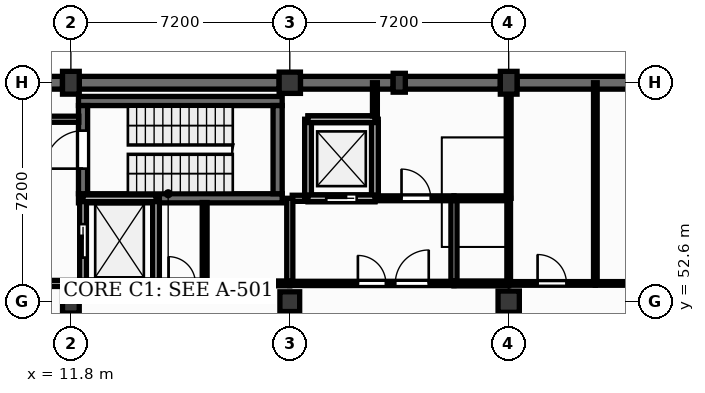
"""IFC4 building model, lengths in metres.
Left out: names, types, materials, properties, quantities, classifications, styles, units other than length and angle.
Written with IfcOpenShell. Run it as: python <this file> out.ifc"""

import sys

from ifc_helpers import new_model, si_unit, direction, frame, frame_2d, origin, origin_2d, place, context, subcontext, project, spatial, rectangle, extrude, element, fill, save


model = new_model("IFC4")
c1 = context("Model", 3, precision=1e-05, world=origin(), true_north=direction((0.0, 1.0)))
c2 = subcontext(c1, "Body", "Model", "MODEL_VIEW")
j1 = project(units=[si_unit("LENGTHUNIT", "METRE"), si_unit("PLANEANGLEUNIT", "RADIAN")], contexts=[c1])
p1 = place(None, origin())
s1 = spatial("IfcSite", under=j1, at=p1, CompositionType="ELEMENT")
p2 = place(p1, origin())
s2 = spatial("IfcBuilding", under=s1, at=p2, CompositionType="ELEMENT")
p3 = place(p2, frame((0.0, 0.0, -4.5)))
s3 = spatial("IfcBuildingStorey", under=s2, at=p3, CompositionType="ELEMENT", Elevation=-4.5)
for number, where, z_axis, x_axis in (
    (1, (11.8, 52.6, 0.0), (0.0, 0.0, 1.0), (1.0, 0.0, 0.0)),
    (2, (11.8, 59.8, 0.0), (0.0, 0.0, 1.0), (1.0, 0.0, 0.0)),
):
    element("IfcColumn", number, at=place(p3, frame(where, z_axis=z_axis, x_axis=x_axis)), inside=s3, PredefinedType="COLUMN", context=c2, shape_type="SweptSolid", body=[
        extrude(rectangle(XDim=0.55, YDim=0.75, at=origin_2d()), origin(), (0.0, 0.0, 1.0), 4.2),
    ])
p4 = place(p3, frame((19.0, 52.6, 0.0), z_axis=(0.0, 0.0, 1.0), x_axis=(1.0, 0.0, 0.0)))
e3 = element("IfcColumn", 3, at=p4, inside=s3, PredefinedType="COLUMN", context=c2, shape_type="SweptSolid", body=[
    extrude(rectangle(XDim=0.65, YDim=0.65, at=origin_2d()), origin(), (0.0, 0.0, 1.0), 4.2),
])
for number, where, z_axis, x_axis in (
    (4, (19.0, 59.8, 0.0), (0.0, 0.0, 1.0), (1.0, 0.0, 0.0)),
    (5, (26.2, 52.6, 0.0), (0.0, 0.0, 1.0), (1.0, 0.0, 0.0)),
):
    element("IfcColumn", number, at=place(p3, frame(where, z_axis=z_axis, x_axis=x_axis)), inside=s3, PredefinedType="COLUMN", context=c2, shape_type="SweptSolid", body=[
        extrude(rectangle(XDim=0.7, YDim=0.7, at=origin_2d()), origin(), (0.0, 0.0, 1.0), 4.2),
    ])
p5 = place(p3, frame((26.2, 59.8, 0.0), z_axis=(0.0, 0.0, 1.0), x_axis=(1.0, 0.0, 0.0)))
e6 = element("IfcColumn", 6, at=p5, inside=s3, PredefinedType="COLUMN", context=c2, shape_type="SweptSolid", body=[
    extrude(rectangle(XDim=0.55, YDim=0.75, at=origin_2d()), origin(), (0.0, 0.0, 1.0), 4.2),
])
p6 = place(p3, frame((22.6, 59.8, 0.0), z_axis=(0.0, 0.0, 1.0), x_axis=(1.0, 0.0, 0.0)))
e7 = element("IfcColumn", 7, at=p6, inside=s3, PredefinedType="PILASTER", context=c2, shape_type="SweptSolid", body=[
    extrude(rectangle(XDim=0.4, YDim=0.62, at=origin_2d()), origin(), (0.0, 0.0, 1.0), 4.2),
])
p7 = place(p3, frame((8.4, 59.8, 0.0), z_axis=(0.0, 0.0, 1.0), x_axis=(1.0, 0.0, 0.0)))
e8 = element("IfcWall", 8, at=p7, inside=s3, PredefinedType="USERDEFINED", context=c2, shape_type="SweptSolid", body=[
    extrude(rectangle(XDim=3.125, YDim=0.42, at=frame_2d((1.562, 0.0))), origin(), (0.0, 0.0, 1.0), 4.2),
])
p8 = place(p3, frame((12.075, 59.8, 0.0), z_axis=(0.0, 0.0, 1.0), x_axis=(1.0, 0.0, 0.0)))
e9 = element("IfcWall", 9, at=p8, inside=s3, PredefinedType="USERDEFINED", context=c2, shape_type="SweptSolid", body=[
    extrude(rectangle(XDim=6.575, YDim=0.42, at=frame_2d((3.288, 0.0))), origin(), (0.0, 0.0, 1.0), 4.2),
])
p9 = place(p3, frame((19.35, 59.8, 0.0), z_axis=(0.0, 0.0, 1.0), x_axis=(1.0, 0.0, 0.0)))
e10 = element("IfcWall", 10, at=p9, inside=s3, PredefinedType="USERDEFINED", context=c2, shape_type="SweptSolid", body=[
    extrude(rectangle(XDim=3.05, YDim=0.42, at=frame_2d((1.525, 0.0))), origin(), (0.0, 0.0, 1.0), 4.2),
])
p10 = place(p3, frame((22.8, 59.8, 0.0), z_axis=(0.0, 0.0, 1.0), x_axis=(1.0, 0.0, 0.0)))
e11 = element("IfcWall", 11, at=p10, inside=s3, PredefinedType="USERDEFINED", context=c2, shape_type="SweptSolid", body=[
    extrude(rectangle(XDim=3.125, YDim=0.42, at=frame_2d((1.562, 0.0))), origin(), (0.0, 0.0, 1.0), 4.2),
])
p11 = place(p3, frame((26.475, 59.8, 0.0), z_axis=(0.0, 0.0, 1.0), x_axis=(1.0, 0.0, 0.0)))
e12 = element("IfcWall", 12, at=p11, inside=s3, PredefinedType="USERDEFINED", context=c2, shape_type="SweptSolid", body=[
    extrude(rectangle(XDim=6.6, YDim=0.42, at=frame_2d((3.3, 0.0))), origin(), (0.0, 0.0, 1.0), 4.2),
])
for number, where, z_axis, x_axis in (
    (13, (12.05, 56.0, 0.0), (0.0, 0.0, 1.0), (1.0, 0.0, 0.0)),
    (14, (12.05, 59.2, 0.0), (0.0, 0.0, 1.0), (1.0, 0.0, 0.0)),
):
    element("IfcWall", number, at=place(p3, frame(where, z_axis=z_axis, x_axis=x_axis)), inside=s3, PredefinedType="SHEAR", context=c2, shape_type="SweptSolid", body=[
        extrude(rectangle(XDim=6.7, YDim=0.3, at=frame_2d((3.35, 0.0))), origin(), (0.0, 0.0, 1.0), 4.25),
    ])
p12 = place(p3, frame((12.2, 56.15, 0.0), z_axis=(0.0, 0.0, 1.0), x_axis=(0.0, 1.0, 0.0)))
e15 = element("IfcWall", 15, at=p12, inside=s3, PredefinedType="SHEAR", context=c2, shape_type="SweptSolid", body=[
    extrude(rectangle(XDim=2.9, YDim=0.3, at=frame_2d((1.45, 0.0))), origin(), (0.0, 0.0, 1.0), 4.25),
])
p13 = place(p12, frame((0.825, 0.0, 0.0)))
e16 = element("IfcOpeningElement", 16, at=p13, cuts=e15, PredefinedType="OPENING", context=c2, shape_type="SweptSolid", body=[
    extrude(rectangle(XDim=1.25, YDim=2.15, at=frame_2d((0.625, 1.075))), frame((0.0, 0.16, 0.0), z_axis=(0.0, -1.0, 0.0), x_axis=(1.0, 0.0, 0.0)), (0.0, 0.0, 1.0), 0.32),
])
p14 = place(p3, frame((18.6, 56.15, 0.0), z_axis=(0.0, 0.0, 1.0), x_axis=(0.0, 1.0, 0.0)))
e17 = element("IfcWall", 17, at=p14, inside=s3, PredefinedType="SHEAR", context=c2, shape_type="SweptSolid", body=[
    extrude(rectangle(XDim=2.9, YDim=0.3, at=frame_2d((1.45, 0.0))), origin(), (0.0, 0.0, 1.0), 4.25),
])
p15 = place(p3, frame((12.2, 53.2, 0.0), z_axis=(0.0, 0.0, 1.0), x_axis=(1.0, 0.0, 0.0)))
e18 = element("IfcWall", 18, at=p15, inside=s3, PredefinedType="SOLIDWALL", context=c2, shape_type="SweptSolid", body=[
    extrude(rectangle(XDim=2.4, YDim=0.22, at=frame_2d((1.2, 0.0))), origin(), (0.0, 0.0, 1.0), 4.25),
])
p16 = place(p3, frame((12.2, 53.31, 0.0), z_axis=(0.0, 0.0, 1.0), x_axis=(0.0, 1.0, 0.0)))
e19 = element("IfcWall", 19, at=p16, inside=s3, PredefinedType="SOLIDWALL", context=c2, shape_type="SweptSolid", body=[
    extrude(rectangle(XDim=2.58, YDim=0.22, at=frame_2d((1.29, 0.0))), origin(), (0.0, 0.0, 1.0), 4.25),
])
p17 = place(p16, frame((0.74, 0.0, 0.0)))
e20 = element("IfcOpeningElement", 20, at=p17, cuts=e19, PredefinedType="OPENING", context=c2, shape_type="SweptSolid", body=[
    extrude(rectangle(XDim=1.1, YDim=2.15, at=frame_2d((0.55, 1.075))), frame((0.0, 0.12, 0.0), z_axis=(0.0, -1.0, 0.0), x_axis=(1.0, 0.0, 0.0)), (0.0, 0.0, 1.0), 0.24),
])
p18 = place(p3, frame((14.6, 53.31, 0.0), z_axis=(0.0, 0.0, 1.0), x_axis=(0.0, 1.0, 0.0)))
e21 = element("IfcWall", 21, at=p18, inside=s3, PredefinedType="SOLIDWALL", context=c2, shape_type="SweptSolid", body=[
    extrude(rectangle(XDim=2.58, YDim=0.22, at=frame_2d((1.29, 0.0))), origin(), (0.0, 0.0, 1.0), 4.25),
])
for number, where, z_axis, x_axis in (
    (22, (12.2, 53.2, -0.9), (0.0, 0.0, 1.0), (0.0, 1.0, 0.0)),
    (23, (14.6, 53.2, -0.9), (0.0, 0.0, 1.0), (0.0, 1.0, 0.0)),
):
    element("IfcWall", number, at=place(p3, frame(where, z_axis=z_axis, x_axis=x_axis)), inside=s3, PredefinedType="SOLIDWALL", context=c2, shape_type="SweptSolid", body=[
        extrude(rectangle(XDim=2.8, YDim=0.22, at=frame_2d((1.4, 0.0))), origin(), (0.0, 0.0, 1.0), 0.9),
    ])
for number, where, z_axis, x_axis in (
    (24, (12.2, 53.2, -0.9), (0.0, 0.0, 1.0), (1.0, 0.0, 0.0)),
    (25, (12.2, 56.0, -0.9), (0.0, 0.0, 1.0), (1.0, 0.0, 0.0)),
):
    element("IfcWall", number, at=place(p3, frame(where, z_axis=z_axis, x_axis=x_axis)), inside=s3, PredefinedType="SOLIDWALL", context=c2, shape_type="SweptSolid", body=[
        extrude(rectangle(XDim=2.4, YDim=0.22, at=frame_2d((1.2, 0.0))), origin(), (0.0, 0.0, 1.0), 0.9),
    ])
p19 = place(p3, frame((19.6, 56.0, 0.0), z_axis=(0.0, 0.0, 1.0), x_axis=(1.0, 0.0, 0.0)))
e26 = element("IfcWall", 26, at=p19, inside=s3, PredefinedType="SOLIDWALL", context=c2, shape_type="SweptSolid", body=[
    extrude(rectangle(XDim=2.2, YDim=0.22, at=frame_2d((1.1, 0.0))), origin(), (0.0, 0.0, 1.0), 4.25),
])
p20 = place(p19, frame((0.6, 0.0, 0.0)))
e27 = element("IfcOpeningElement", 27, at=p20, cuts=e26, PredefinedType="OPENING", context=c2, shape_type="SweptSolid", body=[
    extrude(rectangle(XDim=1.0, YDim=2.15, at=frame_2d((0.5, 1.075))), frame((0.0, 0.12, 0.0), z_axis=(0.0, -1.0, 0.0), x_axis=(1.0, 0.0, 0.0)), (0.0, 0.0, 1.0), 0.24),
])
p21 = place(p3, frame((19.6, 58.6, 0.0), z_axis=(0.0, 0.0, 1.0), x_axis=(1.0, 0.0, 0.0)))
e28 = element("IfcWall", 28, at=p21, inside=s3, PredefinedType="SOLIDWALL", context=c2, shape_type="SweptSolid", body=[
    extrude(rectangle(XDim=2.2, YDim=0.22, at=frame_2d((1.1, 0.0))), origin(), (0.0, 0.0, 1.0), 4.25),
])
for number, where, z_axis, x_axis in (
    (29, (19.6, 56.11, 0.0), (0.0, 0.0, 1.0), (0.0, 1.0, 0.0)),
    (30, (21.8, 56.11, 0.0), (0.0, 0.0, 1.0), (0.0, 1.0, 0.0)),
):
    element("IfcWall", number, at=place(p3, frame(where, z_axis=z_axis, x_axis=x_axis)), inside=s3, PredefinedType="SOLIDWALL", context=c2, shape_type="SweptSolid", body=[
        extrude(rectangle(XDim=2.38, YDim=0.22, at=frame_2d((1.19, 0.0))), origin(), (0.0, 0.0, 1.0), 4.25),
    ])
for number, where, z_axis, x_axis in (
    (31, (19.6, 56.0, -0.9), (0.0, 0.0, 1.0), (0.0, 1.0, 0.0)),
    (32, (21.8, 56.0, -0.9), (0.0, 0.0, 1.0), (0.0, 1.0, 0.0)),
):
    element("IfcWall", number, at=place(p3, frame(where, z_axis=z_axis, x_axis=x_axis)), inside=s3, PredefinedType="SOLIDWALL", context=c2, shape_type="SweptSolid", body=[
        extrude(rectangle(XDim=2.6, YDim=0.22, at=frame_2d((1.3, 0.0))), origin(), (0.0, 0.0, 1.0), 0.9),
    ])
for number, where, z_axis, x_axis in (
    (33, (19.6, 56.0, -0.9), (0.0, 0.0, 1.0), (1.0, 0.0, 0.0)),
    (34, (19.6, 58.6, -0.9), (0.0, 0.0, 1.0), (1.0, 0.0, 0.0)),
):
    element("IfcWall", number, at=place(p3, frame(where, z_axis=z_axis, x_axis=x_axis)), inside=s3, PredefinedType="SOLIDWALL", context=c2, shape_type="SweptSolid", body=[
        extrude(rectangle(XDim=2.2, YDim=0.22, at=frame_2d((1.1, 0.0))), origin(), (0.0, 0.0, 1.0), 0.9),
    ])
p22 = place(p3, frame((7.8, 53.2, 0.0), z_axis=(0.0, 0.0, 1.0), x_axis=(1.0, 0.0, 0.0)))
e35 = element("IfcWall", 35, at=p22, inside=s3, PredefinedType="PARTITIONING", context=c2, shape_type="SweptSolid", body=[
    extrude(rectangle(XDim=4.29, YDim=0.2, at=frame_2d((2.145, 0.0))), origin(), (0.0, 0.0, 1.0), 4.08),
])
p23 = place(p22, frame((1.405, 0.0, 0.0)))
e36 = element("IfcOpeningElement", 36, at=p23, cuts=e35, PredefinedType="OPENING", context=c2, shape_type="SweptSolid", body=[
    extrude(rectangle(XDim=1.48, YDim=2.25, at=frame_2d((0.74, 1.125))), frame((0.0, 0.11, 0.0), z_axis=(0.0, -1.0, 0.0), x_axis=(1.0, 0.0, 0.0)), (0.0, 0.0, 1.0), 0.22),
])
p24 = place(p3, frame((14.71, 53.2, 0.0), z_axis=(0.0, 0.0, 1.0), x_axis=(1.0, 0.0, 0.0)))
e37 = element("IfcWall", 37, at=p24, inside=s3, PredefinedType="SOLIDWALL", context=c2, shape_type="SweptSolid", body=[
    extrude(rectangle(XDim=1.49, YDim=0.22, at=frame_2d((0.745, 0.0))), origin(), (0.0, 0.0, 1.0), 4.08),
])
p25 = place(p24, frame((0.305, 0.0, 0.0)))
e38 = element("IfcOpeningElement", 38, at=p25, cuts=e37, PredefinedType="OPENING", context=c2, shape_type="SweptSolid", body=[
    extrude(rectangle(XDim=0.88, YDim=2.05, at=frame_2d((0.44, 1.025))), frame((0.0, 0.12, 0.0), z_axis=(0.0, -1.0, 0.0), x_axis=(1.0, 0.0, 0.0)), (0.0, 0.0, 1.0), 0.24),
])
p26 = place(p3, frame((19.0, 53.2, 0.0), z_axis=(0.0, 0.0, 1.0), x_axis=(1.0, 0.0, 0.0)))
e39 = element("IfcWall", 39, at=p26, inside=s3, PredefinedType="PARTITIONING", context=c2, shape_type="SweptSolid", body=[
    extrude(rectangle(XDim=5.4, YDim=0.14, at=frame_2d((2.7, 0.0))), origin(), (0.0, 0.0, 1.0), 4.08),
])
p27 = place(p26, frame((2.24, 0.0, 0.0)))
e40 = element("IfcOpeningElement", 40, at=p27, cuts=e39, PredefinedType="OPENING", context=c2, shape_type="SweptSolid", body=[
    extrude(rectangle(XDim=0.92, YDim=2.1, at=frame_2d((0.46, 1.05))), frame((0.0, 0.08, 0.0), z_axis=(0.0, -1.0, 0.0), x_axis=(1.0, 0.0, 0.0)), (0.0, 0.0, 1.0), 0.16),
])
p28 = place(p26, frame((3.47, 0.0, 0.0)))
e41 = element("IfcOpeningElement", 41, at=p28, cuts=e39, PredefinedType="OPENING", context=c2, shape_type="SweptSolid", body=[
    extrude(rectangle(XDim=1.1, YDim=2.1, at=frame_2d((0.55, 1.05))), frame((0.0, 0.08, 0.0), z_axis=(0.0, -1.0, 0.0), x_axis=(1.0, 0.0, 0.0)), (0.0, 0.0, 1.0), 0.16),
])
p29 = place(p3, frame((21.91, 56.0, 0.0), z_axis=(0.0, 0.0, 1.0), x_axis=(1.0, 0.0, 0.0)))
e42 = element("IfcWall", 42, at=p29, inside=s3, PredefinedType="PARTITIONING", context=c2, shape_type="SweptSolid", body=[
    extrude(rectangle(XDim=2.49, YDim=0.16, at=frame_2d((1.245, 0.0))), origin(), (0.0, 0.0, 1.0), 4.08),
])
p30 = place(p29, frame((0.765, 0.0, 0.0)))
e43 = element("IfcOpeningElement", 43, at=p30, cuts=e42, PredefinedType="OPENING", context=c2, shape_type="SweptSolid", body=[
    extrude(rectangle(XDim=0.96, YDim=2.1, at=frame_2d((0.48, 1.05))), frame((0.0, 0.09, 0.0), z_axis=(0.0, -1.0, 0.0), x_axis=(1.0, 0.0, 0.0)), (0.0, 0.0, 1.0), 0.18),
])
p31 = place(p3, frame((26.2, 53.2, 0.0), z_axis=(0.0, 0.0, 1.0), x_axis=(1.0, 0.0, 0.0)))
e44 = element("IfcWall", 44, at=p31, inside=s3, PredefinedType="PLUMBINGWALL", context=c2, shape_type="SweptSolid", body=[
    extrude(rectangle(XDim=2.85, YDim=0.12, at=frame_2d((1.425, 0.0))), origin(), (0.0, 0.0, 1.0), 4.08),
])
p32 = place(p31, frame((0.95, 0.0, 0.0)))
e45 = element("IfcOpeningElement", 45, at=p32, cuts=e44, PredefinedType="OPENING", context=c2, shape_type="SweptSolid", body=[
    extrude(rectangle(XDim=0.95, YDim=2.1, at=frame_2d((0.475, 1.05))), frame((0.0, 0.07, 0.0), z_axis=(0.0, -1.0, 0.0), x_axis=(1.0, 0.0, 0.0)), (0.0, 0.0, 1.0), 0.14),
])
p33 = place(p3, frame((26.2, 56.0, 0.0), z_axis=(0.0, 0.0, 1.0), x_axis=(0.0, 1.0, 0.0)))
e46 = element("IfcWall", 46, at=p33, inside=s3, PredefinedType="PARTITIONING", context=c2, shape_type="SweptSolid", body=[
    extrude(rectangle(XDim=3.425, YDim=0.16, at=frame_2d((1.712, 0.0))), origin(), (0.0, 0.0, 1.0), 3.5),
])
p34 = place(p3, frame((29.05, 53.27, 0.0), z_axis=(0.0, 0.0, 1.0), x_axis=(0.0, 1.0, 0.0)))
e47 = element("IfcWall", 47, at=p34, inside=s3, PredefinedType="PLUMBINGWALL", context=c2, shape_type="SweptSolid", body=[
    extrude(rectangle(XDim=6.53, YDim=0.12, at=frame_2d((3.265, 0.0))), origin(), (0.0, 0.0, 1.0), 4.08),
])
p35 = place(p3, frame((29.05, 53.2, 0.0), z_axis=(0.0, 0.0, 1.0), x_axis=(1.0, 0.0, 0.0)))
e48 = element("IfcWall", 48, at=p35, inside=s3, PredefinedType="PLUMBINGWALL", context=c2, shape_type="SweptSolid", body=[
    extrude(rectangle(XDim=4.35, YDim=0.12, at=frame_2d((2.175, 0.0))), origin(), (0.0, 0.0, 1.0), 4.08),
])
p36 = place(p35, frame((1.7, 0.0, 0.0)))
e49 = element("IfcOpeningElement", 49, at=p36, cuts=e48, PredefinedType="OPENING", context=c2, shape_type="SweptSolid", body=[
    extrude(rectangle(XDim=0.95, YDim=2.1, at=frame_2d((0.475, 1.05))), frame((0.0, 0.07, 0.0), z_axis=(0.0, -1.0, 0.0), x_axis=(1.0, 0.0, 0.0)), (0.0, 0.0, 1.0), 0.14),
])
p37 = place(p3, frame((16.2, 53.27, 0.0), z_axis=(0.0, 0.0, 1.0), x_axis=(0.0, 1.0, 0.0)))
e50 = element("IfcWall", 50, at=p37, inside=s3, PredefinedType="PARTITIONING", context=c2, shape_type="SweptSolid", body=[
    extrude(rectangle(XDim=2.59, YDim=0.16, at=frame_2d((1.295, 0.0))), origin(), (0.0, 0.0, 1.0), 4.08),
])
p38 = place(p3, frame((12.06, 58.6, 0.0), z_axis=(0.0, 0.0, 1.0), x_axis=(-1.0, 0.0, 0.0)))
e51 = element("IfcWall", 51, at=p38, inside=s3, PredefinedType="PARTITIONING", context=c2, shape_type="SweptSolid", body=[
    extrude(rectangle(XDim=4.26, YDim=0.2, at=frame_2d((2.13, 0.0))), origin(), (0.0, 0.0, 1.0), 4.08),
])
p39 = place(p3, frame((24.4, 53.27, 0.0), z_axis=(0.0, 0.0, 1.0), x_axis=(0.0, 1.0, 0.0)))
e52 = element("IfcWall", 52, at=p39, inside=s3, PredefinedType="PARTITIONING", context=c2, shape_type="SweptSolid", body=[
    extrude(rectangle(XDim=2.66, YDim=0.2, at=frame_2d((1.33, 0.0))), origin(), (0.0, 0.0, 1.0), 4.08),
])
p40 = place(p3, frame((19.49, 56.0, 0.0), z_axis=(0.0, 0.0, 1.0), x_axis=(-1.0, 0.0, 0.0)))
e53 = element("IfcWall", 53, at=p40, inside=s3, PredefinedType="PARTITIONING", context=c2, shape_type="SweptSolid", body=[
    extrude(rectangle(XDim=0.41, YDim=0.2, at=frame_2d((0.205, 0.0))), origin(), (0.0, 0.0, 1.0), 4.08),
])
p41 = place(p3, frame((19.0, 53.27, 0.0), z_axis=(0.0, 0.0, 1.0), x_axis=(0.0, 1.0, 0.0)))
e54 = element("IfcWall", 54, at=p41, inside=s3, PredefinedType="PARTITIONING", context=c2, shape_type="SweptSolid", body=[
    extrude(rectangle(XDim=2.73, YDim=0.2, at=frame_2d((1.365, 0.0))), origin(), (0.0, 0.0, 1.0), 3.5),
])
p42 = place(p3, frame((26.2, 53.2, 0.0), z_axis=(0.0, 0.0, 1.0), x_axis=(-1.0, 0.0, 0.0)))
e55 = element("IfcWall", 55, at=p42, inside=s3, PredefinedType="PARTITIONING", context=c2, shape_type="SweptSolid", body=[
    extrude(rectangle(XDim=1.8, YDim=0.16, at=frame_2d((0.9, 0.0))), origin(), (0.0, 0.0, 1.0), 4.08),
])
p43 = place(p3, frame((19.0, 53.2, 0.0), z_axis=(0.0, 0.0, 1.0), x_axis=(-1.0, 0.0, 0.0)))
e56 = element("IfcWall", 56, at=p43, inside=s3, PredefinedType="PARTITIONING", context=c2, shape_type="SweptSolid", body=[
    extrude(rectangle(XDim=2.8, YDim=0.16, at=frame_2d((1.4, 0.0))), origin(), (0.0, 0.0, 1.0), 4.08),
])
p44 = place(p3, frame((26.2, 53.27, 0.0), z_axis=(0.0, 0.0, 1.0), x_axis=(0.0, 1.0, 0.0)))
e57 = element("IfcWall", 57, at=p44, inside=s3, PredefinedType="PLUMBINGWALL", context=c2, shape_type="SweptSolid", body=[
    extrude(rectangle(XDim=2.73, YDim=0.12, at=frame_2d((1.365, 0.0))), origin(), (0.0, 0.0, 1.0), 3.5),
])
p45 = place(p3, frame((24.4, 56.0, 0.0), z_axis=(0.0, 0.0, 1.0), x_axis=(1.0, 0.0, 0.0)))
e58 = element("IfcWall", 58, at=p45, inside=s3, PredefinedType="PARTITIONING", context=c2, shape_type="SweptSolid", body=[
    extrude(rectangle(XDim=1.8, YDim=0.16, at=frame_2d((0.9, 0.0))), origin(), (0.0, 0.0, 1.0), 4.08),
])
p46 = place(p3, frame((21.8, 58.71, 0.0), z_axis=(0.0, 0.0, 1.0), x_axis=(0.0, 1.0, 0.0)))
e59 = element("IfcWall", 59, at=p46, inside=s3, PredefinedType="PARTITIONING", context=c2, shape_type="SweptSolid", body=[
    extrude(rectangle(XDim=1.09, YDim=0.16, at=frame_2d((0.545, 0.0))), origin(), (0.0, 0.0, 1.0), 4.08),
])
p47 = place(p17, origin())
e60 = element("IfcDoor", 60, at=p47, inside=s3, OperationType="SLIDING_TO_LEFT", PredefinedType="DOOR", context=c2, shape_type="SweptSolid", body=[
    extrude(rectangle(XDim=1.1, YDim=2.15, at=frame_2d((0.55, 1.075))), frame((0.0, 0.025, 0.0), z_axis=(0.0, -1.0, 0.0), x_axis=(1.0, 0.0, 0.0)), (0.0, 0.0, 1.0), 0.05),
])
fill(e20, e60)
p48 = place(p20, origin())
e61 = element("IfcDoor", 61, at=p48, inside=s3, OperationType="SLIDING_TO_LEFT", PredefinedType="DOOR", context=c2, shape_type="SweptSolid", body=[
    extrude(rectangle(XDim=1.0, YDim=2.15, at=frame_2d((0.5, 1.075))), frame((0.0, 0.025, 0.0), z_axis=(0.0, -1.0, 0.0), x_axis=(1.0, 0.0, 0.0)), (0.0, 0.0, 1.0), 0.05),
])
fill(e27, e61)
p49 = place(p13, origin())
e62 = element("IfcDoor", 62, at=p49, inside=s3, OperationType="SINGLE_SWING_LEFT", PredefinedType="DOOR", context=c2, shape_type="SweptSolid", body=[
    extrude(rectangle(XDim=1.25, YDim=2.15, at=frame_2d((0.625, 1.075))), frame((0.0, 0.025, 0.0), z_axis=(0.0, -1.0, 0.0), x_axis=(1.0, 0.0, 0.0)), (0.0, 0.0, 1.0), 0.05),
])
fill(e16, e62)
p50 = place(p27, origin())
e63 = element("IfcDoor", 63, at=p50, inside=s3, OperationType="SINGLE_SWING_LEFT", PredefinedType="DOOR", context=c2, shape_type="SweptSolid", body=[
    extrude(rectangle(XDim=0.92, YDim=2.1, at=frame_2d((0.46, 1.05))), frame((0.0, 0.025, 0.0), z_axis=(0.0, -1.0, 0.0), x_axis=(1.0, 0.0, 0.0)), (0.0, 0.0, 1.0), 0.05),
])
fill(e40, e63)
p51 = place(p28, origin())
e64 = element("IfcDoor", 64, at=p51, inside=s3, OperationType="SINGLE_SWING_RIGHT", PredefinedType="DOOR", context=c2, shape_type="SweptSolid", body=[
    extrude(rectangle(XDim=1.1, YDim=2.1, at=frame_2d((0.55, 1.05))), frame((0.0, 0.025, 0.0), z_axis=(0.0, -1.0, 0.0), x_axis=(1.0, 0.0, 0.0)), (0.0, 0.0, 1.0), 0.05),
])
fill(e41, e64)
p52 = place(p25, origin())
e65 = element("IfcDoor", 65, at=p52, inside=s3, OperationType="SINGLE_SWING_LEFT", PredefinedType="DOOR", context=c2, shape_type="SweptSolid", body=[
    extrude(rectangle(XDim=0.88, YDim=2.05, at=frame_2d((0.44, 1.025))), frame((0.0, 0.025, 0.0), z_axis=(0.0, -1.0, 0.0), x_axis=(1.0, 0.0, 0.0)), (0.0, 0.0, 1.0), 0.05),
])
fill(e38, e65)
p53 = place(p32, origin())
e66 = element("IfcDoor", 66, at=p53, inside=s3, OperationType="SINGLE_SWING_LEFT", PredefinedType="DOOR", context=c2, shape_type="SweptSolid", body=[
    extrude(rectangle(XDim=0.95, YDim=2.1, at=frame_2d((0.475, 1.05))), frame((0.0, 0.025, 0.0), z_axis=(0.0, -1.0, 0.0), x_axis=(1.0, 0.0, 0.0)), (0.0, 0.0, 1.0), 0.05),
])
fill(e45, e66)
p54 = place(p30, origin())
e67 = element("IfcDoor", 67, at=p54, inside=s3, OperationType="SINGLE_SWING_LEFT", PredefinedType="DOOR", context=c2, shape_type="SweptSolid", body=[
    extrude(rectangle(XDim=0.96, YDim=2.1, at=frame_2d((0.48, 1.05))), frame((0.0, 0.025, 0.0), z_axis=(0.0, -1.0, 0.0), x_axis=(1.0, 0.0, 0.0)), (0.0, 0.0, 1.0), 0.05),
])
fill(e43, e67)
save(model, sys.argv[1])
